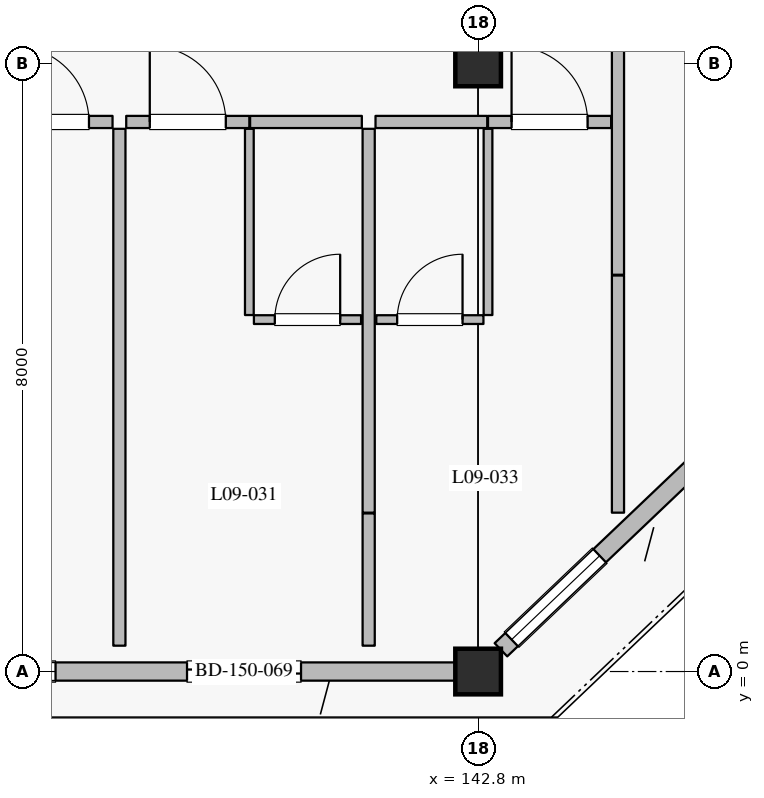
"""IFC4 building model, lengths in metres.
Left out: names, types, materials, properties, quantities, classifications, styles, units other than length and angle.
Written with IfcOpenShell. Run it as: python <this file> out.ifc"""

import sys

from ifc_helpers import new_model, si_unit, direction, frame, frame_2d, origin, origin_2d, place, context, subcontext, project, spatial, rectangle, extrude, element, fill, save


model = new_model("IFC4")
c1 = context("Model", 3, precision=1e-05, world=origin(), true_north=direction((0.0, 1.0)))
c2 = subcontext(c1, "Body", "Model", "MODEL_VIEW")
j1 = project(units=[si_unit("LENGTHUNIT", "METRE"), si_unit("PLANEANGLEUNIT", "RADIAN")], contexts=[c1])
p1 = place(None, origin())
s1 = spatial("IfcSite", under=j1, at=p1, CompositionType="ELEMENT")
p2 = place(p1, origin())
s2 = spatial("IfcBuilding", under=s1, at=p2, CompositionType="ELEMENT")
p3 = place(p2, frame((0.0, 0.0, 39.6)))
s3 = spatial("IfcBuildingStorey", under=s2, at=p3, CompositionType="ELEMENT", Elevation=39.6)
for number, where, z_axis, x_axis in (
    (1, (142.8, 0.0, 0.0), (0.0, 0.0, 1.0), (1.0, 0.0, 0.0)),
    (2, (142.8, 8.0, 0.0), (0.0, 0.0, 1.0), (1.0, 0.0, 0.0)),
):
    element("IfcColumn", number, at=place(p3, frame(where, z_axis=z_axis, x_axis=x_axis)), inside=s3, PredefinedType="COLUMN", context=c2, shape_type="SweptSolid", body=[
        extrude(rectangle(XDim=0.6, YDim=0.6, at=origin_2d()), origin(), (0.0, 0.0, 1.0), 3.6),
    ])
p4 = place(p3, frame((142.5, 0.0, 0.0), z_axis=(0.0, 0.0, 1.0), x_axis=(-1.0, 0.0, 0.0)))
e3 = element("IfcWall", 3, at=p4, inside=s3, PredefinedType="SOLIDWALL", context=c2, shape_type="SweptSolid", body=[
    extrude(rectangle(XDim=7.8, YDim=0.24, at=frame_2d((3.9, 0.0))), origin(), (0.0, 0.0, 1.0), 2.94),
])
p5 = place(p4, frame((2.03, 0.0, 0.0)))
e4 = element("IfcOpeningElement", 4, at=p5, cuts=e3, PredefinedType="OPENING", context=c2, shape_type="SweptSolid", body=[
    extrude(rectangle(XDim=1.5, YDim=2.25, at=frame_2d((0.75, 1.125))), frame((0.0, 0.13, 0.0), z_axis=(0.0, -1.0, 0.0), x_axis=(1.0, 0.0, 0.0)), (0.0, 0.0, 1.0), 0.26),
])
p6 = place(p4, frame((5.26, 0.0, 0.8)))
e5 = element("IfcOpeningElement", 5, at=p6, cuts=e3, PredefinedType="OPENING", context=c2, shape_type="SweptSolid", body=[
    extrude(rectangle(XDim=1.6, YDim=1.6, at=frame_2d((0.8, 0.8))), frame((0.0, 0.13, 0.0), z_axis=(0.0, -1.0, 0.0), x_axis=(1.0, 0.0, 0.0)), (0.0, 0.0, 1.0), 0.26),
])
p7 = place(p3, frame((150.9, 7.714, 0.0), z_axis=(0.0, 0.0, 1.0), x_axis=(-0.724145477467, -0.689647248573, 0.0)))
e6 = element("IfcWall", 6, at=p7, inside=s3, PredefinedType="SOLIDWALL", context=c2, shape_type="SweptSolid", body=[
    extrude(rectangle(XDim=10.771, YDim=0.24, at=frame_2d((5.385, 0.0))), origin(), (0.0, 0.0, 1.0), 2.94),
])
p8 = place(p7, frame((1.238, 0.0, 0.0)))
e7 = element("IfcOpeningElement", 7, at=p8, cuts=e6, PredefinedType="OPENING", context=c2, shape_type="SweptSolid", body=[
    extrude(rectangle(XDim=1.5, YDim=2.25, at=frame_2d((0.75, 1.125))), frame((0.0, 0.13, 0.0), z_axis=(0.0, -1.0, 0.0), x_axis=(1.0, 0.0, 0.0)), (0.0, 0.0, 1.0), 0.26),
])
p9 = place(p7, frame((5.58, 0.0, 0.8)))
e8 = element("IfcOpeningElement", 8, at=p9, cuts=e6, PredefinedType="OPENING", context=c2, shape_type="SweptSolid", body=[
    extrude(rectangle(XDim=1.6, YDim=1.6, at=frame_2d((0.8, 0.8))), frame((0.0, 0.13, 0.0), z_axis=(0.0, -1.0, 0.0), x_axis=(1.0, 0.0, 0.0)), (0.0, 0.0, 1.0), 0.26),
])
p10 = place(p7, frame((8.977, 0.0, 0.8)))
e9 = element("IfcOpeningElement", 9, at=p10, cuts=e6, PredefinedType="OPENING", context=c2, shape_type="SweptSolid", body=[
    extrude(rectangle(XDim=1.6, YDim=1.6, at=frame_2d((0.8, 0.8))), frame((0.0, 0.13, 0.0), z_axis=(0.0, -1.0, 0.0), x_axis=(1.0, 0.0, 0.0)), (0.0, 0.0, 1.0), 0.26),
])
p11 = place(p3, frame((136.37, 7.23, 0.0), z_axis=(0.0, 0.0, 1.0), x_axis=(1.0, 0.0, 0.0)))
e10 = element("IfcWall", 10, at=p11, inside=s3, PredefinedType="PARTITIONING", context=c2, shape_type="SweptSolid", body=[
    extrude(rectangle(XDim=1.62, YDim=0.16, at=frame_2d((0.81, 0.0))), origin(), (0.0, 0.0, 1.0), 3.335),
])
p12 = place(p11, frame((0.31, 0.0, 0.0)))
e11 = element("IfcOpeningElement", 11, at=p12, cuts=e10, PredefinedType="OPENING", context=c2, shape_type="SweptSolid", body=[
    extrude(rectangle(XDim=1.0, YDim=2.25, at=frame_2d((0.5, 1.125))), frame((0.0, 0.09, 0.0), z_axis=(0.0, -1.0, 0.0), x_axis=(1.0, 0.0, 0.0)), (0.0, 0.0, 1.0), 0.18),
])
p13 = place(p3, frame((138.17, 7.23, 0.0), z_axis=(0.0, 0.0, 1.0), x_axis=(1.0, 0.0, 0.0)))
e12 = element("IfcWall", 12, at=p13, inside=s3, PredefinedType="PARTITIONING", context=c2, shape_type="SweptSolid", body=[
    extrude(rectangle(XDim=1.62, YDim=0.16, at=frame_2d((0.81, 0.0))), origin(), (0.0, 0.0, 1.0), 3.335),
])
p14 = place(p13, frame((0.31, 0.0, 0.0)))
e13 = element("IfcOpeningElement", 13, at=p14, cuts=e12, PredefinedType="OPENING", context=c2, shape_type="SweptSolid", body=[
    extrude(rectangle(XDim=1.0, YDim=2.25, at=frame_2d((0.5, 1.125))), frame((0.0, 0.09, 0.0), z_axis=(0.0, -1.0, 0.0), x_axis=(1.0, 0.0, 0.0)), (0.0, 0.0, 1.0), 0.18),
])
p15 = place(p3, frame((139.8, 7.23, 0.0), z_axis=(0.0, 0.0, 1.0), x_axis=(1.0, 0.0, 0.0)))
e14 = element("IfcWall", 14, at=p15, inside=s3, PredefinedType="PARTITIONING", context=c2, shape_type="SweptSolid", body=[
    extrude(rectangle(XDim=1.47, YDim=0.16, at=frame_2d((0.735, 0.0))), origin(), (0.0, 0.0, 1.0), 3.335),
])
p16 = place(p3, frame((139.79, 4.69, 0.0), z_axis=(0.0, 0.0, 1.0), x_axis=(0.0, 1.0, 0.0)))
e15 = element("IfcWall", 15, at=p16, inside=s3, PredefinedType="PARTITIONING", context=c2, shape_type="SweptSolid", body=[
    extrude(rectangle(XDim=2.45, YDim=0.115, at=frame_2d((1.225, 0.0))), origin(), (0.0, 0.0, 1.0), 3.335),
])
p17 = place(p3, frame((139.85, 4.63, 0.0), z_axis=(0.0, 0.0, 1.0), x_axis=(1.0, 0.0, 0.0)))
e16 = element("IfcWall", 16, at=p17, inside=s3, PredefinedType="PARTITIONING", context=c2, shape_type="SweptSolid", body=[
    extrude(rectangle(XDim=1.41, YDim=0.115, at=frame_2d((0.705, 0.0))), origin(), (0.0, 0.0, 1.0), 3.335),
])
p18 = place(p17, frame((0.275, 0.0, 0.0)))
e17 = element("IfcOpeningElement", 17, at=p18, cuts=e16, PredefinedType="OPENING", context=c2, shape_type="SweptSolid", body=[
    extrude(rectangle(XDim=0.86, YDim=2.12, at=frame_2d((0.43, 1.06))), frame((0.0, 0.067, 0.0), z_axis=(0.0, -1.0, 0.0), x_axis=(1.0, 0.0, 0.0)), (0.0, 0.0, 1.0), 0.135),
])
p19 = place(p3, frame((138.08, 0.34, 0.0), z_axis=(0.0, 0.0, 1.0), x_axis=(0.0, 1.0, 0.0)))
e18 = element("IfcWall", 18, at=p19, inside=s3, PredefinedType="PARTITIONING", context=c2, shape_type="SweptSolid", body=[
    extrude(rectangle(XDim=6.8, YDim=0.16, at=frame_2d((3.4, 0.0))), origin(), (0.0, 0.0, 1.0), 3.335),
])
p20 = place(p3, frame((141.36, 0.34, 0.0), z_axis=(0.0, 0.0, 1.0), x_axis=(0.0, 1.0, 0.0)))
e19 = element("IfcWall", 19, at=p20, inside=s3, PredefinedType="PARTITIONING", context=c2, shape_type="SweptSolid", body=[
    extrude(rectangle(XDim=1.74, YDim=0.16, at=frame_2d((0.87, 0.0))), origin(), (0.0, 0.0, 1.0), 3.335),
])
p21 = place(p3, frame((141.45, 7.23, 0.0), z_axis=(0.0, 0.0, 1.0), x_axis=(1.0, 0.0, 0.0)))
e20 = element("IfcWall", 20, at=p21, inside=s3, PredefinedType="PARTITIONING", context=c2, shape_type="SweptSolid", body=[
    extrude(rectangle(XDim=1.47, YDim=0.16, at=frame_2d((0.735, 0.0))), origin(), (0.0, 0.0, 1.0), 3.335),
])
p22 = place(p3, frame((142.93, 7.23, 0.0), z_axis=(0.0, 0.0, 1.0), x_axis=(1.0, 0.0, 0.0)))
e21 = element("IfcWall", 21, at=p22, inside=s3, PredefinedType="PARTITIONING", context=c2, shape_type="SweptSolid", body=[
    extrude(rectangle(XDim=1.62, YDim=0.16, at=frame_2d((0.81, 0.0))), origin(), (0.0, 0.0, 1.0), 3.335),
])
p23 = place(p22, frame((0.31, 0.0, 0.0)))
e22 = element("IfcOpeningElement", 22, at=p23, cuts=e21, PredefinedType="OPENING", context=c2, shape_type="SweptSolid", body=[
    extrude(rectangle(XDim=1.0, YDim=2.25, at=frame_2d((0.5, 1.125))), frame((0.0, 0.09, 0.0), z_axis=(0.0, -1.0, 0.0), x_axis=(1.0, 0.0, 0.0)), (0.0, 0.0, 1.0), 0.18),
])
p24 = place(p3, frame((142.93, 4.69, 0.0), z_axis=(0.0, 0.0, 1.0), x_axis=(0.0, 1.0, 0.0)))
e23 = element("IfcWall", 23, at=p24, inside=s3, PredefinedType="PARTITIONING", context=c2, shape_type="SweptSolid", body=[
    extrude(rectangle(XDim=2.45, YDim=0.115, at=frame_2d((1.225, 0.0))), origin(), (0.0, 0.0, 1.0), 2.74),
])
p25 = place(p3, frame((141.46, 4.63, 0.0), z_axis=(0.0, 0.0, 1.0), x_axis=(1.0, 0.0, 0.0)))
e24 = element("IfcWall", 24, at=p25, inside=s3, PredefinedType="PARTITIONING", context=c2, shape_type="SweptSolid", body=[
    extrude(rectangle(XDim=1.41, YDim=0.115, at=frame_2d((0.705, 0.0))), origin(), (0.0, 0.0, 1.0), 3.335),
])
p26 = place(p25, frame((0.275, 0.0, 0.0)))
e25 = element("IfcOpeningElement", 25, at=p26, cuts=e24, PredefinedType="OPENING", context=c2, shape_type="SweptSolid", body=[
    extrude(rectangle(XDim=0.86, YDim=2.12, at=frame_2d((0.43, 1.06))), frame((0.0, 0.067, 0.0), z_axis=(0.0, -1.0, 0.0), x_axis=(1.0, 0.0, 0.0)), (0.0, 0.0, 1.0), 0.135),
])
p27 = place(p3, frame((141.36, 2.09, 0.0), z_axis=(0.0, 0.0, 1.0), x_axis=(0.0, 1.0, 0.0)))
e26 = element("IfcWall", 26, at=p27, inside=s3, PredefinedType="PARTITIONING", context=c2, shape_type="SweptSolid", body=[
    extrude(rectangle(XDim=5.05, YDim=0.16, at=frame_2d((2.525, 0.0))), origin(), (0.0, 0.0, 1.0), 3.335),
])
p28 = place(p3, frame((144.64, 2.09, 0.0), z_axis=(0.0, 0.0, 1.0), x_axis=(0.0, 1.0, 0.0)))
e27 = element("IfcWall", 27, at=p28, inside=s3, PredefinedType="PARTITIONING", context=c2, shape_type="SweptSolid", body=[
    extrude(rectangle(XDim=3.12, YDim=0.16, at=frame_2d((1.56, 0.0))), origin(), (0.0, 0.0, 1.0), 3.335),
])
p29 = place(p3, frame((144.64, 5.22, 0.0), z_axis=(0.0, 0.0, 1.0), x_axis=(0.0, 1.0, 0.0)))
e28 = element("IfcWall", 28, at=p29, inside=s3, PredefinedType="PARTITIONING", context=c2, shape_type="SweptSolid", body=[
    extrude(rectangle(XDim=9.32, YDim=0.16, at=frame_2d((4.66, 0.0))), origin(), (0.0, 0.0, 1.0), 3.335),
])
p30 = place(p5, origin())
e29 = element("IfcDoor", 29, at=p30, inside=s3, OperationType="SLIDING_TO_LEFT", PredefinedType="DOOR", context=c2, shape_type="SweptSolid", body=[
    extrude(rectangle(XDim=1.5, YDim=2.25, at=frame_2d((0.75, 1.125))), frame((0.0, 0.025, 0.0), z_axis=(0.0, -1.0, 0.0), x_axis=(1.0, 0.0, 0.0)), (0.0, 0.0, 1.0), 0.05),
])
fill(e4, e29)
p31 = place(p6, origin())
e30 = element("IfcWindow", 30, at=p31, inside=s3, PartitioningType="SINGLE_PANEL", PredefinedType="WINDOW", context=c2, shape_type="SweptSolid", body=[
    extrude(rectangle(XDim=1.6, YDim=1.6, at=frame_2d((0.8, 0.8))), frame((0.0, 0.03, 0.0), z_axis=(0.0, -1.0, 0.0), x_axis=(1.0, 0.0, 0.0)), (0.0, 0.0, 1.0), 0.06),
])
fill(e5, e30)
p32 = place(p10, origin())
e31 = element("IfcWindow", 31, at=p32, inside=s3, PartitioningType="SINGLE_PANEL", PredefinedType="WINDOW", context=c2, shape_type="SweptSolid", body=[
    extrude(rectangle(XDim=1.6, YDim=1.6, at=frame_2d((0.8, 0.8))), frame((0.0, 0.03, 0.0), z_axis=(0.0, -1.0, 0.0), x_axis=(1.0, 0.0, 0.0)), (0.0, 0.0, 1.0), 0.06),
])
fill(e9, e31)
p33 = place(p12, origin())
e32 = element("IfcDoor", 32, at=p33, inside=s3, OperationType="SINGLE_SWING_LEFT", PredefinedType="DOOR", context=c2, shape_type="SweptSolid", body=[
    extrude(rectangle(XDim=1.0, YDim=2.25, at=frame_2d((0.5, 1.125))), frame((0.0, 0.025, 0.0), z_axis=(0.0, -1.0, 0.0), x_axis=(1.0, 0.0, 0.0)), (0.0, 0.0, 1.0), 0.05),
])
fill(e11, e32)
p34 = place(p14, origin())
e33 = element("IfcDoor", 33, at=p34, inside=s3, OperationType="SINGLE_SWING_LEFT", PredefinedType="DOOR", context=c2, shape_type="SweptSolid", body=[
    extrude(rectangle(XDim=1.0, YDim=2.25, at=frame_2d((0.5, 1.125))), frame((0.0, 0.025, 0.0), z_axis=(0.0, -1.0, 0.0), x_axis=(1.0, 0.0, 0.0)), (0.0, 0.0, 1.0), 0.05),
])
fill(e13, e33)
p35 = place(p18, origin())
e34 = element("IfcDoor", 34, at=p35, inside=s3, OperationType="SINGLE_SWING_RIGHT", PredefinedType="DOOR", context=c2, shape_type="SweptSolid", body=[
    extrude(rectangle(XDim=0.86, YDim=2.12, at=frame_2d((0.43, 1.06))), frame((0.0, 0.025, 0.0), z_axis=(0.0, -1.0, 0.0), x_axis=(1.0, 0.0, 0.0)), (0.0, 0.0, 1.0), 0.05),
])
fill(e17, e34)
p36 = place(p23, origin())
e35 = element("IfcDoor", 35, at=p36, inside=s3, OperationType="SINGLE_SWING_LEFT", PredefinedType="DOOR", context=c2, shape_type="SweptSolid", body=[
    extrude(rectangle(XDim=1.0, YDim=2.25, at=frame_2d((0.5, 1.125))), frame((0.0, 0.025, 0.0), z_axis=(0.0, -1.0, 0.0), x_axis=(1.0, 0.0, 0.0)), (0.0, 0.0, 1.0), 0.05),
])
fill(e22, e35)
p37 = place(p26, origin())
e36 = element("IfcDoor", 36, at=p37, inside=s3, OperationType="SINGLE_SWING_RIGHT", PredefinedType="DOOR", context=c2, shape_type="SweptSolid", body=[
    extrude(rectangle(XDim=0.86, YDim=2.12, at=frame_2d((0.43, 1.06))), frame((0.0, 0.025, 0.0), z_axis=(0.0, -1.0, 0.0), x_axis=(1.0, 0.0, 0.0)), (0.0, 0.0, 1.0), 0.05),
])
fill(e25, e36)
save(model, sys.argv[1])
